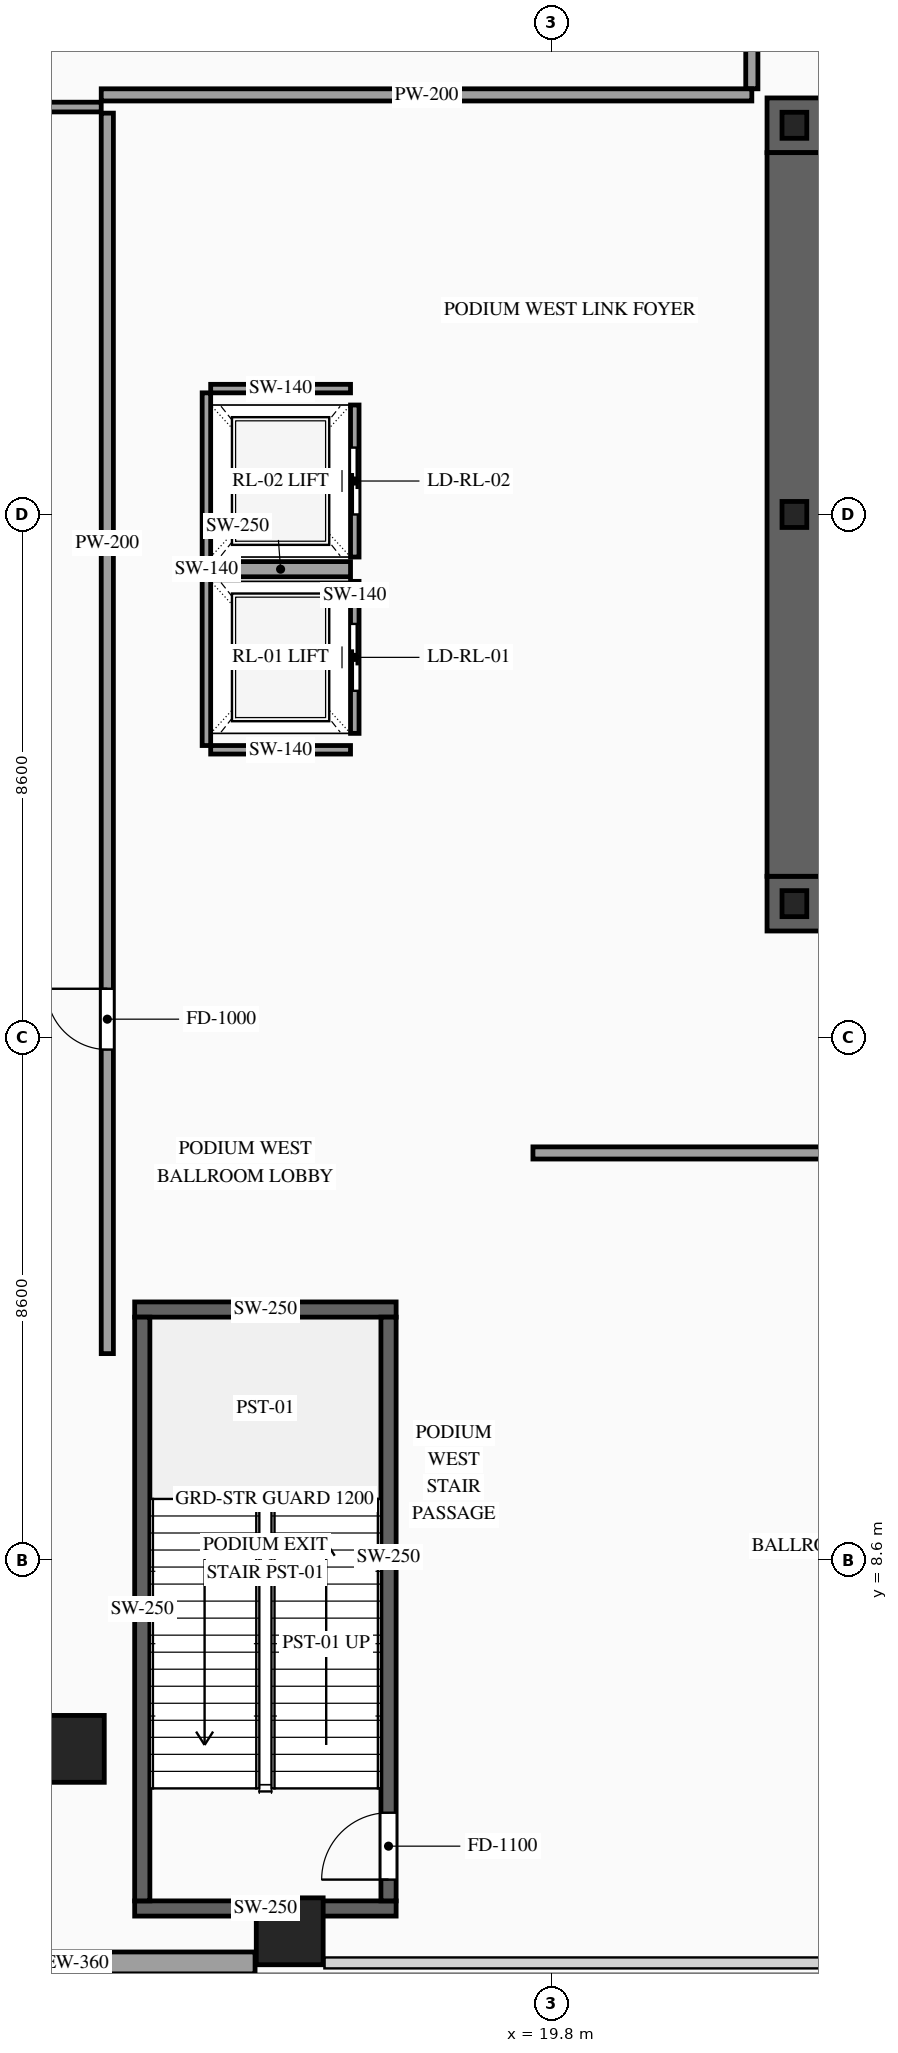
"""IFC4 building model, lengths in metres.
Left out: names, types, materials, properties, quantities, classifications, styles, units other than length and angle.
Written with IfcOpenShell. Run it as: python <this file> out.ifc"""

import sys

from ifc_helpers import new_model, si_unit, direction, frame, frame_2d, origin, origin_2d, place, context, subcontext, project, spatial, rectangle, i_section, extrude, source, transform, mapped, element, fill, save


model = new_model("IFC4")
c1 = context("Model", 3, precision=1e-05, world=origin(), true_north=direction((0.0, 1.0)))
c2 = subcontext(c1, "Body", "Model", "MODEL_VIEW")
j1 = project(units=[si_unit("LENGTHUNIT", "METRE"), si_unit("PLANEANGLEUNIT", "RADIAN")], contexts=[c1])
p1 = place(None, origin())
s1 = spatial("IfcSite", under=j1, at=p1, CompositionType="ELEMENT")
p2 = place(p1, origin())
s2 = spatial("IfcBuilding", under=s1, at=p2, CompositionType="ELEMENT")
p3 = place(p2, frame((0.0, 0.0, 19.8)))
s3 = spatial("IfcBuildingStorey", under=s2, at=p3, CompositionType="ELEMENT", Elevation=19.8)
p4 = place(p3, frame((23.35, 19.4, 0.0), z_axis=(0.0, 0.0, 1.0), x_axis=(1.0, 0.0, 0.0)))
e1 = element("IfcWall", 1, at=p4, inside=s3, PredefinedType="SHEAR", context=c2, shape_type="SweptSolid", body=[
    extrude(rectangle(XDim=27.3, YDim=0.9, at=frame_2d((13.65, 0.0))), origin(), (0.0, 0.0, 1.0), 6.0),
])
p5 = place(p4, frame((2.1, 0.0, 0.0)))
e2 = element("IfcOpeningElement", 2, at=p5, cuts=e1, PredefinedType="OPENING", context=c2, shape_type="SweptSolid", body=[
    extrude(rectangle(XDim=1.1, YDim=2.2, at=frame_2d((0.55, 1.1))), frame((0.0, 0.465, 0.0), z_axis=(0.0, -1.0, 0.0), x_axis=(1.0, 0.0, 0.0)), (0.0, 0.0, 1.0), 0.93),
])
p6 = place(p4, frame((10.0, 0.0, 0.0)))
e3 = element("IfcOpeningElement", 3, at=p6, cuts=e1, PredefinedType="OPENING", context=c2, shape_type="SweptSolid", body=[
    extrude(rectangle(XDim=1.1, YDim=2.2, at=frame_2d((0.55, 1.1))), frame((0.0, 0.465, 0.0), z_axis=(0.0, -1.0, 0.0), x_axis=(1.0, 0.0, 0.0)), (0.0, 0.0, 1.0), 0.93),
])
p7 = place(p4, frame((23.2, 0.0, 0.0)))
e4 = element("IfcOpeningElement", 4, at=p7, cuts=e1, PredefinedType="OPENING", context=c2, shape_type="SweptSolid", body=[
    extrude(rectangle(XDim=1.1, YDim=2.2, at=frame_2d((0.55, 1.1))), frame((0.0, 0.465, 0.0), z_axis=(0.0, -1.0, 0.0), x_axis=(1.0, 0.0, 0.0)), (0.0, 0.0, 1.0), 0.93),
])
p8 = place(p4, frame((19.82, 0.0, 0.0)))
e5 = element("IfcOpeningElement", 5, at=p8, cuts=e1, PredefinedType="OPENING", context=c2, shape_type="SweptSolid", body=[
    extrude(rectangle(XDim=0.9, YDim=2.15, at=frame_2d((0.45, 1.075))), frame((0.0, 0.465, 0.0), z_axis=(0.0, -1.0, 0.0), x_axis=(1.0, 0.0, 0.0)), (0.0, 0.0, 1.0), 0.93),
])
p9 = place(p4, frame((18.38, 0.0, 0.0)))
e6 = element("IfcOpeningElement", 6, at=p9, cuts=e1, PredefinedType="OPENING", context=c2, shape_type="SweptSolid", body=[
    extrude(rectangle(XDim=0.9, YDim=2.15, at=frame_2d((0.45, 1.075))), frame((0.0, 0.465, 0.0), z_axis=(0.0, -1.0, 0.0), x_axis=(1.0, 0.0, 0.0)), (0.0, 0.0, 1.0), 0.93),
])
p10 = place(p3, frame((23.35, 32.2, 0.0), z_axis=(0.0, 0.0, 1.0), x_axis=(1.0, 0.0, 0.0)))
e7 = element("IfcWall", 7, at=p10, inside=s3, PredefinedType="SHEAR", context=c2, shape_type="SweptSolid", body=[
    extrude(rectangle(XDim=27.3, YDim=0.9, at=frame_2d((13.65, 0.0))), origin(), (0.0, 0.0, 1.0), 6.0),
])
p11 = place(p10, frame((4.72, 0.0, 0.0)))
e8 = element("IfcOpeningElement", 8, at=p11, cuts=e7, PredefinedType="OPENING", context=c2, shape_type="SweptSolid", body=[
    extrude(rectangle(XDim=0.9, YDim=2.15, at=frame_2d((0.45, 1.075))), frame((0.0, 0.465, 0.0), z_axis=(0.0, -1.0, 0.0), x_axis=(1.0, 0.0, 0.0)), (0.0, 0.0, 1.0), 0.93),
])
p12 = place(p10, frame((10.0, 0.0, 0.0)))
e9 = element("IfcOpeningElement", 9, at=p12, cuts=e7, PredefinedType="OPENING", context=c2, shape_type="SweptSolid", body=[
    extrude(rectangle(XDim=1.1, YDim=2.2, at=frame_2d((0.55, 1.1))), frame((0.0, 0.465, 0.0), z_axis=(0.0, -1.0, 0.0), x_axis=(1.0, 0.0, 0.0)), (0.0, 0.0, 1.0), 0.93),
])
p13 = place(p10, frame((15.85, 0.0, 0.0)))
e10 = element("IfcOpeningElement", 10, at=p13, cuts=e7, PredefinedType="OPENING", context=c2, shape_type="SweptSolid", body=[
    extrude(rectangle(XDim=1.1, YDim=2.2, at=frame_2d((0.55, 1.1))), frame((0.0, 0.465, 0.0), z_axis=(0.0, -1.0, 0.0), x_axis=(1.0, 0.0, 0.0)), (0.0, 0.0, 1.0), 0.93),
])
p14 = place(p10, frame((19.82, 0.0, 0.0)))
e11 = element("IfcOpeningElement", 11, at=p14, cuts=e7, PredefinedType="OPENING", context=c2, shape_type="SweptSolid", body=[
    extrude(rectangle(XDim=0.9, YDim=2.15, at=frame_2d((0.45, 1.075))), frame((0.0, 0.465, 0.0), z_axis=(0.0, -1.0, 0.0), x_axis=(1.0, 0.0, 0.0)), (0.0, 0.0, 1.0), 0.93),
])
m1 = source(origin(), c2, "Body", "SweptSolid", [
    extrude(rectangle(XDim=11.9, YDim=0.9, at=frame_2d((5.95, 0.0))), origin(), (0.0, 0.0, 1.0), 6.0),
])
p15 = place(p3, frame((23.8, 19.85, 0.0), z_axis=(0.0, 0.0, 1.0), x_axis=(0.0, 1.0, 0.0)))
e12 = element("IfcWall", 12, at=p15, inside=s3, PredefinedType="SHEAR", context=c2, shape_type="MappedRepresentation", body=[
    mapped(m1, transform((0.0, 0.0, 0.0), scale=1.0)),
])
m2 = source(origin(), c2, "Body", "SweptSolid", [
    extrude(i_section(OverallWidth=0.407, OverallDepth=0.428, WebThickness=0.02, FlangeThickness=0.035, at=origin_2d()), origin(), (0.0, 0.0, 1.0), 6.0),
])
for number, where, z_axis, x_axis in (
    (13, (23.8, 19.4, 0.0), (0.0, 0.0, 1.0), (1.0, 0.0, 0.0)),
    (14, (23.8, 25.8, 0.0), (0.0, 0.0, 1.0), (1.0, 0.0, 0.0)),
    (15, (23.8, 32.2, 0.0), (0.0, 0.0, 1.0), (1.0, 0.0, 0.0)),
):
    element("IfcColumn", number, at=place(p3, frame(where, z_axis=z_axis, x_axis=x_axis)), inside=s3, PredefinedType="COLUMN", context=c2, shape_type="MappedRepresentation", body=[
        mapped(m2, transform((0.0, 0.0, 0.0), scale=1.0)),
    ])
m3 = source(origin(), c2, "Body", "SweptSolid", [
    extrude(rectangle(XDim=1.1, YDim=1.1, at=origin_2d()), origin(), (0.0, 0.0, 1.0), 6.0),
])
for number, where, z_axis, x_axis in (
    (16, (11.9, 5.5, 0.0), (0.0, 0.0, 1.0), (1.0, 0.0, 0.0)),
    (17, (15.5, 2.5, 0.0), (0.0, 0.0, 1.0), (1.0, 0.0, 0.0)),
):
    element("IfcColumn", number, at=place(p3, frame(where, z_axis=z_axis, x_axis=x_axis)), inside=s3, PredefinedType="COLUMN", context=c2, shape_type="MappedRepresentation", body=[
        mapped(m3, transform((0.0, 0.0, 0.0), scale=1.0)),
    ])
p16 = place(p3, frame((2.0, 1.98, 0.0), z_axis=(0.0, 0.0, 1.0), x_axis=(1.0, 0.0, 0.0)))
e18 = element("IfcWall", 18, at=p16, inside=s3, PredefinedType="SOLIDWALL", context=c2, shape_type="SweptSolid", body=[
    extrude(rectangle(XDim=12.93, YDim=0.36, at=frame_2d((6.465, 0.0))), origin(), (0.0, 0.0, 1.0), 5.68),
])
p17 = place(p16, frame((4.4, 0.0, 0.85)))
e19 = element("IfcOpeningElement", 19, at=p17, cuts=e18, PredefinedType="OPENING", context=c2, shape_type="SweptSolid", body=[
    extrude(rectangle(XDim=2.4, YDim=2.4, at=frame_2d((1.2, 1.2))), frame((0.0, 0.195, 0.0), z_axis=(0.0, -1.0, 0.0), x_axis=(1.0, 0.0, 0.0)), (0.0, 0.0, 1.0), 0.39),
])
p18 = place(p3, frame((16.57, 22.2, 0.0), z_axis=(0.0, 0.0, 1.0), x_axis=(0.0, 1.0, 0.0)))
e20 = element("IfcWall", 20, at=p18, inside=s3, PredefinedType="SOLIDWALL", context=c2, shape_type="SweptSolid", body=[
    extrude(rectangle(XDim=2.5, YDim=0.14, at=frame_2d((1.25, 0.0))), origin(), (0.0, 0.0, 1.0), 5.68),
])
p19 = place(p18, frame((0.7, 0.0, 0.0)))
e21 = element("IfcOpeningElement", 21, at=p19, cuts=e20, PredefinedType="OPENING", context=c2, shape_type="SweptSolid", body=[
    extrude(rectangle(XDim=1.1, YDim=2.2, at=frame_2d((0.55, 1.1))), frame((0.0, 0.085, 0.0), z_axis=(0.0, -1.0, 0.0), x_axis=(1.0, 0.0, 0.0)), (0.0, 0.0, 1.0), 0.17),
])
m4 = source(origin(), c2, "Body", "SweptSolid", [
    extrude(rectangle(XDim=2.3, YDim=0.25, at=frame_2d((1.15, 0.0))), origin(), (0.0, 0.0, 1.0), 5.68),
])
p20 = place(p3, frame((14.2, 24.9, 0.0), z_axis=(0.0, 0.0, 1.0), x_axis=(1.0, 0.0, 0.0)))
e22 = element("IfcWall", 22, at=p20, inside=s3, PredefinedType="SOLIDWALL", context=c2, shape_type="MappedRepresentation", body=[
    mapped(m4, transform((0.0, 0.0, 0.0), scale=1.0)),
])
m5 = source(origin(), c2, "Body", "SweptSolid", [
    extrude(rectangle(XDim=5.8, YDim=0.14, at=frame_2d((2.9, 0.0))), origin(), (0.0, 0.0, 1.0), 5.68),
])
p21 = place(p3, frame((14.13, 22.0, 0.0), z_axis=(0.0, 0.0, 1.0), x_axis=(0.0, 1.0, 0.0)))
e23 = element("IfcWall", 23, at=p21, inside=s3, PredefinedType="SOLIDWALL", context=c2, shape_type="MappedRepresentation", body=[
    mapped(m5, transform((0.0, 0.0, 0.0), scale=1.0)),
])
m6 = source(origin(), c2, "Body", "SweptSolid", [
    extrude(rectangle(XDim=2.3, YDim=0.14, at=frame_2d((1.15, 0.0))), origin(), (0.0, 0.0, 1.0), 5.68),
])
p22 = place(p3, frame((14.2, 21.93, 0.0), z_axis=(0.0, 0.0, 1.0), x_axis=(1.0, 0.0, 0.0)))
e24 = element("IfcWall", 24, at=p22, inside=s3, PredefinedType="SOLIDWALL", context=c2, shape_type="MappedRepresentation", body=[
    mapped(m6, transform((0.0, 0.0, 0.0), scale=1.0)),
])
p23 = place(p3, frame((16.57, 25.1, 0.0), z_axis=(0.0, 0.0, 1.0), x_axis=(0.0, 1.0, 0.0)))
e25 = element("IfcWall", 25, at=p23, inside=s3, PredefinedType="SOLIDWALL", context=c2, shape_type="SweptSolid", body=[
    extrude(rectangle(XDim=2.5, YDim=0.14, at=frame_2d((1.25, 0.0))), origin(), (0.0, 0.0, 1.0), 5.68),
])
p24 = place(p23, frame((0.7, 0.0, 0.0)))
e26 = element("IfcOpeningElement", 26, at=p24, cuts=e25, PredefinedType="OPENING", context=c2, shape_type="SweptSolid", body=[
    extrude(rectangle(XDim=1.1, YDim=2.2, at=frame_2d((0.55, 1.1))), frame((0.0, 0.085, 0.0), z_axis=(0.0, -1.0, 0.0), x_axis=(1.0, 0.0, 0.0)), (0.0, 0.0, 1.0), 0.17),
])
p25 = place(p3, frame((14.2, 27.87, 0.0), z_axis=(0.0, 0.0, 1.0), x_axis=(1.0, 0.0, 0.0)))
e27 = element("IfcWall", 27, at=p25, inside=s3, PredefinedType="SOLIDWALL", context=c2, shape_type="MappedRepresentation", body=[
    mapped(m6, transform((0.0, 0.0, 0.0), scale=1.0)),
])
m7 = source(origin(), c2, "Body", "SweptSolid", [
    extrude(rectangle(XDim=4.3, YDim=0.25, at=frame_2d((2.15, 0.0))), origin(), (0.0, 0.0, 1.0), 5.68),
])
for number, where, z_axis, x_axis in (
    (28, (12.95, 2.875, 0.0), (0.0, 0.0, 1.0), (1.0, 0.0, 0.0)),
    (29, (12.95, 12.725, 0.0), (0.0, 0.0, 1.0), (1.0, 0.0, 0.0)),
):
    element("IfcWall", number, at=place(p3, frame(where, z_axis=z_axis, x_axis=x_axis)), inside=s3, PredefinedType="SOLIDWALL", context=c2, shape_type="MappedRepresentation", body=[
        mapped(m7, transform((0.0, 0.0, 0.0), scale=1.0)),
    ])
m8 = source(origin(), c2, "Body", "SweptSolid", [
    extrude(rectangle(XDim=9.6, YDim=0.25, at=frame_2d((4.8, 0.0))), origin(), (0.0, 0.0, 1.0), 5.68),
])
p26 = place(p3, frame((13.075, 3.0, 0.0), z_axis=(0.0, 0.0, 1.0), x_axis=(0.0, 1.0, 0.0)))
e30 = element("IfcWall", 30, at=p26, inside=s3, PredefinedType="SOLIDWALL", context=c2, shape_type="MappedRepresentation", body=[
    mapped(m8, transform((0.0, 0.0, 0.0), scale=1.0)),
])
p27 = place(p3, frame((17.125, 3.0, 0.0), z_axis=(0.0, 0.0, 1.0), x_axis=(0.0, 1.0, 0.0)))
e31 = element("IfcWall", 31, at=p27, inside=s3, PredefinedType="SOLIDWALL", context=c2, shape_type="SweptSolid", body=[
    extrude(rectangle(XDim=9.6, YDim=0.25, at=frame_2d((4.8, 0.0))), origin(), (0.0, 0.0, 1.0), 5.68),
])
p28 = place(p27, frame((0.35, 0.0, 0.0)))
e32 = element("IfcOpeningElement", 32, at=p28, cuts=e31, PredefinedType="OPENING", context=c2, shape_type="SweptSolid", body=[
    extrude(rectangle(XDim=1.1, YDim=2.2, at=frame_2d((0.55, 1.1))), frame((0.0, 0.14, 0.0), z_axis=(0.0, -1.0, 0.0), x_axis=(1.0, 0.0, 0.0)), (0.0, 0.0, 1.0), 0.28),
])
p29 = place(p3, frame((23.1, 32.8, 0.0), z_axis=(0.0, 0.0, 1.0), x_axis=(0.0, 1.0, 0.0)))
e33 = element("IfcWall", 33, at=p29, inside=s3, PredefinedType="PARTITIONING", context=c2, shape_type="SweptSolid", body=[
    extrude(rectangle(XDim=16.82, YDim=0.2, at=frame_2d((8.41, 0.0))), origin(), (0.0, 0.0, 1.0), 5.68),
])
p30 = place(p29, frame((1.05, 0.0, 0.0)))
e34 = element("IfcOpeningElement", 34, at=p30, cuts=e33, PredefinedType="OPENING", context=c2, shape_type="SweptSolid", body=[
    extrude(rectangle(XDim=1.5, YDim=2.3, at=frame_2d((0.75, 1.15))), frame((0.0, 0.115, 0.0), z_axis=(0.0, -1.0, 0.0), x_axis=(1.0, 0.0, 0.0)), (0.0, 0.0, 1.0), 0.23),
])
m9 = source(origin(), c2, "Body", "SweptSolid", [
    extrude(rectangle(XDim=10.7, YDim=0.2, at=frame_2d((5.35, 0.0))), origin(), (0.0, 0.0, 1.0), 5.68),
])
p31 = place(p3, frame((12.4, 32.7, 0.0), z_axis=(0.0, 0.0, 1.0), x_axis=(1.0, 0.0, 0.0)))
e35 = element("IfcWall", 35, at=p31, inside=s3, PredefinedType="PARTITIONING", context=c2, shape_type="MappedRepresentation", body=[
    mapped(m9, transform((0.0, 0.0, 0.0), scale=1.0)),
])
p32 = place(p3, frame((19.5, 15.3, 0.0), z_axis=(0.0, 0.0, 1.0), x_axis=(1.0, 0.0, 0.0)))
e36 = element("IfcWall", 36, at=p32, inside=s3, PredefinedType="PARTITIONING", context=c2, shape_type="SweptSolid", body=[
    extrude(rectangle(XDim=35.0, YDim=0.2, at=frame_2d((17.5, 0.0))), origin(), (0.0, 0.0, 1.0), 5.68),
])
p33 = place(p32, frame((13.25, 0.0, 0.0)))
e37 = element("IfcOpeningElement", 37, at=p33, cuts=e36, PredefinedType="OPENING", context=c2, shape_type="SweptSolid", body=[
    extrude(rectangle(XDim=1.5, YDim=2.3, at=frame_2d((0.75, 1.15))), frame((0.0, 0.115, 0.0), z_axis=(0.0, -1.0, 0.0), x_axis=(1.0, 0.0, 0.0)), (0.0, 0.0, 1.0), 0.23),
])
p34 = place(p3, frame((12.5, 12.0, 0.0), z_axis=(0.0, 0.0, 1.0), x_axis=(0.0, 1.0, 0.0)))
e38 = element("IfcWall", 38, at=p34, inside=s3, PredefinedType="PARTITIONING", context=c2, shape_type="SweptSolid", body=[
    extrude(rectangle(XDim=20.4, YDim=0.2, at=frame_2d((10.2, 0.0))), origin(), (0.0, 0.0, 1.0), 5.68),
])
p35 = place(p34, frame((5.0, 0.0, 0.0)))
e39 = element("IfcOpeningElement", 39, at=p35, cuts=e38, PredefinedType="OPENING", context=c2, shape_type="SweptSolid", body=[
    extrude(rectangle(XDim=1.0, YDim=2.2, at=frame_2d((0.5, 1.1))), frame((0.0, 0.115, 0.0), z_axis=(0.0, -1.0, 0.0), x_axis=(1.0, 0.0, 0.0)), (0.0, 0.0, 1.0), 0.23),
])
m10 = source(origin(), c2, "Body", "SweptSolid", [
    extrude(rectangle(XDim=10.22, YDim=0.16, at=frame_2d((5.11, 0.0))), origin(), (0.0, 0.0, 1.0), 5.68),
])
p36 = place(p3, frame((2.18, 32.5, 0.0), z_axis=(0.0, 0.0, 1.0), x_axis=(1.0, 0.0, 0.0)))
e40 = element("IfcWall", 40, at=p36, inside=s3, PredefinedType="PARTITIONING", context=c2, shape_type="MappedRepresentation", body=[
    mapped(m10, transform((0.0, 0.0, 0.0), scale=1.0)),
])
m11 = source(origin(), c2, "Body", "SweptSolid", [
    extrude(rectangle(XDim=1.1, YDim=2.2, at=frame_2d((0.55, 1.1))), frame((0.0, 0.025, 0.0), z_axis=(0.0, -1.0, 0.0), x_axis=(1.0, 0.0, 0.0)), (0.0, 0.0, 1.0), 0.05),
])
p37 = place(p19, origin())
e41 = element("IfcDoor", 41, at=p37, inside=s3, OperationType="SLIDING_TO_RIGHT", PredefinedType="DOOR", context=c2, shape_type="MappedRepresentation", body=[
    mapped(m11, transform((0.0, 0.0, 0.0), scale=1.0)),
])
fill(e21, e41)
p38 = place(p24, origin())
e42 = element("IfcDoor", 42, at=p38, inside=s3, OperationType="SLIDING_TO_LEFT", PredefinedType="DOOR", context=c2, shape_type="MappedRepresentation", body=[
    mapped(m11, transform((0.0, 0.0, 0.0), scale=1.0)),
])
fill(e26, e42)
m12 = source(origin(), c2, "Body", "SweptSolid", [
    extrude(rectangle(XDim=1.1, YDim=2.2, at=frame_2d((0.55, 1.1))), frame((0.0, 0.025, 0.0), z_axis=(0.0, -1.0, 0.0), x_axis=(1.0, 0.0, 0.0)), (0.0, 0.0, 1.0), 0.05),
])
p39 = place(p28, origin())
e43 = element("IfcDoor", 43, at=p39, inside=s3, OperationType="SINGLE_SWING_LEFT", PredefinedType="DOOR", context=c2, shape_type="MappedRepresentation", body=[
    mapped(m12, transform((0.0, 0.0, 0.0), scale=1.0)),
])
fill(e32, e43)
m13 = source(origin(), c2, "Body", "SweptSolid", [
    extrude(rectangle(XDim=1.0, YDim=2.2, at=frame_2d((0.5, 1.1))), frame((0.0, 0.025, 0.0), z_axis=(0.0, -1.0, 0.0), x_axis=(1.0, 0.0, 0.0)), (0.0, 0.0, 1.0), 0.05),
])
p40 = place(p35, origin())
e44 = element("IfcDoor", 44, at=p40, inside=s3, OperationType="SINGLE_SWING_RIGHT", PredefinedType="DOOR", context=c2, shape_type="MappedRepresentation", body=[
    mapped(m13, transform((0.0, 0.0, 0.0), scale=1.0)),
])
fill(e39, e44)
save(model, sys.argv[1])
